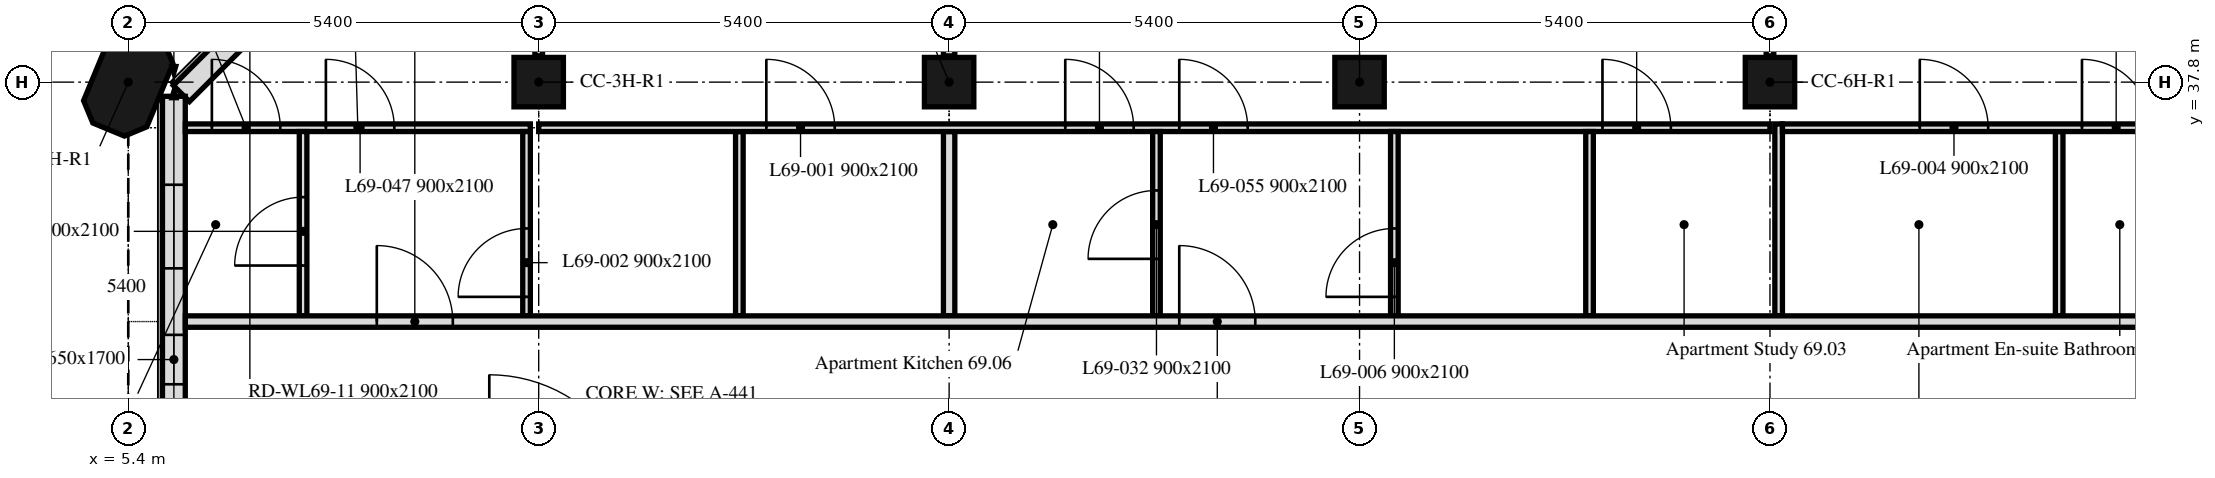
"""IFC4 building model, lengths in metres.
Left out: names, types, materials, properties, quantities, classifications, styles, units other than length and angle.
Written with IfcOpenShell. Run it as: python <this file> out.ifc"""

import sys

from ifc_helpers import new_model, si_unit, direction, frame, frame_2d, origin, origin_2d, place, context, subcontext, project, spatial, polyline, rectangle, outline, extrude, element, fill, save


model = new_model("IFC4")
c1 = context("Model", 3, precision=1e-05, world=origin(), true_north=direction((0.0, 1.0)))
c2 = subcontext(c1, "Body", "Model", "MODEL_VIEW")
j1 = project(units=[si_unit("LENGTHUNIT", "METRE"), si_unit("PLANEANGLEUNIT", "RADIAN")], contexts=[c1])
p1 = place(None, origin())
s1 = spatial("IfcSite", under=j1, at=p1, CompositionType="ELEMENT")
p2 = place(p1, origin())
s2 = spatial("IfcBuilding", under=s1, at=p2, CompositionType="ELEMENT")
p3 = place(p2, frame((0.0, 0.0, 281.8)))
s3 = spatial("IfcBuildingStorey", under=s2, at=p3, CompositionType="ELEMENT", Elevation=281.8)
p4 = place(p3, frame((5.4, 37.8, 0.0), z_axis=(0.0, 0.0, 1.0), x_axis=(0.382683432365, 0.923879532511, 0.0)))
e1 = element("IfcColumn", 1, at=p4, inside=s3, PredefinedType="COLUMN", context=c2, shape_type="SweptSolid", body=[
    extrude(outline(polyline([(-0.45, -0.45), (0.45, -0.45), (0.675, -0.225), (0.675, 0.225), (0.45, 0.45), (-0.45, 0.45), (-0.675, 0.225), (-0.675, -0.225), (-0.45, -0.45)])), origin(), (0.0, 0.0, 1.0), 3.0),
])
for number, where, z_axis, x_axis in (
    (2, (10.8, 37.8, 0.0), (0.0, 0.0, 1.0), (1.0, 0.0, 0.0)),
    (3, (16.2, 37.8, 0.0), (0.0, 0.0, 1.0), (1.0, 0.0, 0.0)),
    (4, (21.6, 37.8, 0.0), (0.0, 0.0, 1.0), (1.0, 0.0, 0.0)),
    (5, (27.0, 37.8, 0.0), (0.0, 0.0, 1.0), (1.0, 0.0, 0.0)),
):
    element("IfcColumn", number, at=place(p3, frame(where, z_axis=z_axis, x_axis=x_axis)), inside=s3, PredefinedType="COLUMN", context=c2, shape_type="SweptSolid", body=[
        extrude(rectangle(XDim=0.65, YDim=0.65, at=origin_2d()), origin(), (0.0, 0.0, 1.0), 3.0),
    ])
p5 = place(p3, frame((10.949, 42.501, 0.0), z_axis=(0.0, 0.0, 1.0), x_axis=(-0.707106781187, -0.707106781187, 0.0)))
e6 = element("IfcWall", 6, at=p5, inside=s3, PredefinedType="SOLIDWALL", context=c2, shape_type="SweptSolid", body=[
    extrude(rectangle(XDim=6.86, YDim=0.3, at=frame_2d((3.43, 0.0))), origin(), (0.0, 0.0, 1.0), 3.0),
])
p6 = place(p5, frame((1.28, 0.0, 0.9)))
e7 = element("IfcOpeningElement", 7, at=p6, cuts=e6, PredefinedType="OPENING", context=c2, shape_type="SweptSolid", body=[
    extrude(rectangle(XDim=1.1, YDim=1.7, at=frame_2d((0.55, 0.85))), frame((0.0, 0.16, 0.0), z_axis=(0.0, -1.0, 0.0), x_axis=(1.0, 0.0, 0.0)), (0.0, 0.0, 1.0), 0.32),
])
p7 = place(p5, frame((4.48, 0.0, 0.9)))
e8 = element("IfcOpeningElement", 8, at=p7, cuts=e6, PredefinedType="OPENING", context=c2, shape_type="SweptSolid", body=[
    extrude(rectangle(XDim=1.1, YDim=1.7, at=frame_2d((0.55, 0.85))), frame((0.0, 0.16, 0.0), z_axis=(0.0, -1.0, 0.0), x_axis=(1.0, 0.0, 0.0)), (0.0, 0.0, 1.0), 0.32),
])
p8 = place(p3, frame((6.0, 37.614, 0.0), z_axis=(0.0, 0.0, 1.0), x_axis=(0.0, -1.0, 0.0)))
e9 = element("IfcWall", 9, at=p8, inside=s3, PredefinedType="SOLIDWALL", context=c2, shape_type="SweptSolid", body=[
    extrude(rectangle(XDim=5.214, YDim=0.3, at=frame_2d((2.607, 0.0))), origin(), (0.0, 0.0, 1.0), 3.0),
])
p9 = place(p8, frame((1.164, 0.0, 0.9)))
e10 = element("IfcOpeningElement", 10, at=p9, cuts=e9, PredefinedType="OPENING", context=c2, shape_type="SweptSolid", body=[
    extrude(rectangle(XDim=1.1, YDim=1.7, at=frame_2d((0.55, 0.85))), frame((0.0, 0.16, 0.0), z_axis=(0.0, -1.0, 0.0), x_axis=(1.0, 0.0, 0.0)), (0.0, 0.0, 1.0), 0.32),
])
p10 = place(p8, frame((3.139, 0.0, 0.9)))
e11 = element("IfcOpeningElement", 11, at=p10, cuts=e9, PredefinedType="OPENING", context=c2, shape_type="SweptSolid", body=[
    extrude(rectangle(XDim=0.65, YDim=1.7, at=frame_2d((0.325, 0.85))), frame((0.0, 0.16, 0.0), z_axis=(0.0, -1.0, 0.0), x_axis=(1.0, 0.0, 0.0)), (0.0, 0.0, 1.0), 0.32),
])
p11 = place(p3, frame((6.151, 37.2, 0.0), z_axis=(0.0, 0.0, 1.0), x_axis=(1.0, 0.0, 0.0)))
e12 = element("IfcWall", 12, at=p11, inside=s3, PredefinedType="PARTITIONING", context=c2, shape_type="SweptSolid", body=[
    extrude(rectangle(XDim=4.539, YDim=0.1, at=frame_2d((2.27, 0.0))), origin(), (0.0, 0.0, 1.0), 3.0),
])
p12 = place(p11, frame((0.349, 0.0, 0.0)))
e13 = element("IfcOpeningElement", 13, at=p12, cuts=e12, PredefinedType="OPENING", context=c2, shape_type="SweptSolid", body=[
    extrude(rectangle(XDim=0.9, YDim=2.1, at=frame_2d((0.45, 1.05))), frame((0.0, 0.05, 0.0), z_axis=(0.0, -1.0, 0.0), x_axis=(1.0, 0.0, 0.0)), (0.0, 0.0, 1.0), 0.1),
])
p13 = place(p11, frame((1.849, 0.0, 0.0)))
e14 = element("IfcOpeningElement", 14, at=p13, cuts=e12, PredefinedType="OPENING", context=c2, shape_type="SweptSolid", body=[
    extrude(rectangle(XDim=0.9, YDim=2.1, at=frame_2d((0.45, 1.05))), frame((0.0, 0.05, 0.0), z_axis=(0.0, -1.0, 0.0), x_axis=(1.0, 0.0, 0.0)), (0.0, 0.0, 1.0), 0.1),
])
p14 = place(p3, frame((10.8, 38.145, 0.0), z_axis=(0.0, 0.0, 1.0), x_axis=(0.0, 1.0, 0.0)))
e15 = element("IfcWall", 15, at=p14, inside=s3, PredefinedType="PARTITIONING", context=c2, shape_type="SweptSolid", body=[
    extrude(rectangle(XDim=3.943, YDim=0.1, at=frame_2d((1.971, 0.0))), origin(), (0.0, 0.0, 1.0), 3.0),
])
p15 = place(p14, frame((1.355, 0.0, 0.0)))
e16 = element("IfcOpeningElement", 16, at=p15, cuts=e15, PredefinedType="OPENING", context=c2, shape_type="SweptSolid", body=[
    extrude(rectangle(XDim=0.9, YDim=2.1, at=frame_2d((0.45, 1.05))), frame((0.0, 0.05, 0.0), z_axis=(0.0, -1.0, 0.0), x_axis=(1.0, 0.0, 0.0)), (0.0, 0.0, 1.0), 0.1),
])
p16 = place(p3, frame((16.2, 38.145, 0.0), z_axis=(0.0, 0.0, 1.0), x_axis=(0.0, 1.0, 0.0)))
e17 = element("IfcWall", 17, at=p16, inside=s3, PredefinedType="PARTITIONING", context=c2, shape_type="SweptSolid", body=[
    extrude(rectangle(XDim=4.304, YDim=0.15, at=frame_2d((2.152, 0.0))), origin(), (0.0, 0.0, 1.0), 3.0),
])
p17 = place(p3, frame((7.7, 34.725, 0.0), z_axis=(0.0, 0.0, 1.0), x_axis=(0.0, 1.0, 0.0)))
e18 = element("IfcWall", 18, at=p17, inside=s3, PredefinedType="PARTITIONING", context=c2, shape_type="SweptSolid", body=[
    extrude(rectangle(XDim=2.425, YDim=0.1, at=frame_2d((1.212, 0.0))), origin(), (0.0, 0.0, 1.0), 3.0),
])
p18 = place(p17, frame((0.662, 0.0, 0.0)))
e19 = element("IfcOpeningElement", 19, at=p18, cuts=e18, PredefinedType="OPENING", context=c2, shape_type="SweptSolid", body=[
    extrude(rectangle(XDim=0.9, YDim=2.1, at=frame_2d((0.45, 1.05))), frame((0.0, 0.05, 0.0), z_axis=(0.0, -1.0, 0.0), x_axis=(1.0, 0.0, 0.0)), (0.0, 0.0, 1.0), 0.1),
])
p19 = place(p3, frame((10.64, 34.725, 0.0), z_axis=(0.0, 0.0, 1.0), x_axis=(0.0, 1.0, 0.0)))
e20 = element("IfcWall", 20, at=p19, inside=s3, PredefinedType="PARTITIONING", context=c2, shape_type="SweptSolid", body=[
    extrude(rectangle(XDim=2.425, YDim=0.1, at=frame_2d((1.212, 0.0))), origin(), (0.0, 0.0, 1.0), 3.0),
])
p20 = place(p19, frame((0.25, 0.0, 0.0)))
e21 = element("IfcOpeningElement", 21, at=p20, cuts=e20, PredefinedType="OPENING", context=c2, shape_type="SweptSolid", body=[
    extrude(rectangle(XDim=0.9, YDim=2.1, at=frame_2d((0.45, 1.05))), frame((0.0, 0.05, 0.0), z_axis=(0.0, -1.0, 0.0), x_axis=(1.0, 0.0, 0.0)), (0.0, 0.0, 1.0), 0.1),
])
p21 = place(p3, frame((13.44, 34.725, 0.0), z_axis=(0.0, 0.0, 1.0), x_axis=(0.0, 1.0, 0.0)))
e22 = element("IfcWall", 22, at=p21, inside=s3, PredefinedType="PARTITIONING", context=c2, shape_type="SweptSolid", body=[
    extrude(rectangle(XDim=2.425, YDim=0.1, at=frame_2d((1.212, 0.0))), origin(), (0.0, 0.0, 1.0), 3.0),
])
p22 = place(p3, frame((16.2, 34.725, 0.0), z_axis=(0.0, 0.0, 1.0), x_axis=(0.0, 1.0, 0.0)))
e23 = element("IfcWall", 23, at=p22, inside=s3, PredefinedType="PARTITIONING", context=c2, shape_type="SweptSolid", body=[
    extrude(rectangle(XDim=2.425, YDim=0.15, at=frame_2d((1.212, 0.0))), origin(), (0.0, 0.0, 1.0), 3.0),
])
p23 = place(p3, frame((10.8, 37.2, 0.0), z_axis=(0.0, 0.0, 1.0), x_axis=(1.0, 0.0, 0.0)))
e24 = element("IfcWall", 24, at=p23, inside=s3, PredefinedType="PARTITIONING", context=c2, shape_type="SweptSolid", body=[
    extrude(rectangle(XDim=16.2, YDim=0.1, at=frame_2d((8.1, 0.0))), origin(), (0.0, 0.0, 1.0), 3.0),
])
p24 = place(p23, frame((2.995, 0.0, 0.0)))
e25 = element("IfcOpeningElement", 25, at=p24, cuts=e24, PredefinedType="OPENING", context=c2, shape_type="SweptSolid", body=[
    extrude(rectangle(XDim=0.9, YDim=2.1, at=frame_2d((0.45, 1.05))), frame((0.0, 0.05, 0.0), z_axis=(0.0, -1.0, 0.0), x_axis=(1.0, 0.0, 0.0)), (0.0, 0.0, 1.0), 0.1),
])
p25 = place(p23, frame((13.996, 0.0, 0.0)))
e26 = element("IfcOpeningElement", 26, at=p25, cuts=e24, PredefinedType="OPENING", context=c2, shape_type="SweptSolid", body=[
    extrude(rectangle(XDim=0.9, YDim=2.1, at=frame_2d((0.45, 1.05))), frame((0.0, 0.05, 0.0), z_axis=(0.0, -1.0, 0.0), x_axis=(1.0, 0.0, 0.0)), (0.0, 0.0, 1.0), 0.1),
])
p26 = place(p23, frame((6.928, 0.0, 0.0)))
e27 = element("IfcOpeningElement", 27, at=p26, cuts=e24, PredefinedType="OPENING", context=c2, shape_type="SweptSolid", body=[
    extrude(rectangle(XDim=0.9, YDim=2.1, at=frame_2d((0.45, 1.05))), frame((0.0, 0.05, 0.0), z_axis=(0.0, -1.0, 0.0), x_axis=(1.0, 0.0, 0.0)), (0.0, 0.0, 1.0), 0.1),
])
p27 = place(p23, frame((8.428, 0.0, 0.0)))
e28 = element("IfcOpeningElement", 28, at=p27, cuts=e24, PredefinedType="OPENING", context=c2, shape_type="SweptSolid", body=[
    extrude(rectangle(XDim=0.9, YDim=2.1, at=frame_2d((0.45, 1.05))), frame((0.0, 0.05, 0.0), z_axis=(0.0, -1.0, 0.0), x_axis=(1.0, 0.0, 0.0)), (0.0, 0.0, 1.0), 0.1),
])
p28 = place(p3, frame((27.0, 38.145, 0.0), z_axis=(0.0, 0.0, 1.0), x_axis=(0.0, 1.0, 0.0)))
e29 = element("IfcWall", 29, at=p28, inside=s3, PredefinedType="PARTITIONING", context=c2, shape_type="SweptSolid", body=[
    extrude(rectangle(XDim=4.304, YDim=0.1, at=frame_2d((2.152, 0.0))), origin(), (0.0, 0.0, 1.0), 3.0),
])
p29 = place(p28, frame((1.98, 0.0, 0.0)))
e30 = element("IfcOpeningElement", 30, at=p29, cuts=e29, PredefinedType="OPENING", context=c2, shape_type="SweptSolid", body=[
    extrude(rectangle(XDim=0.9, YDim=2.1, at=frame_2d((0.45, 1.05))), frame((0.0, 0.05, 0.0), z_axis=(0.0, -1.0, 0.0), x_axis=(1.0, 0.0, 0.0)), (0.0, 0.0, 1.0), 0.1),
])
p30 = place(p3, frame((18.928, 34.725, 0.0), z_axis=(0.0, 0.0, 1.0), x_axis=(0.0, 1.0, 0.0)))
e31 = element("IfcWall", 31, at=p30, inside=s3, PredefinedType="PARTITIONING", context=c2, shape_type="SweptSolid", body=[
    extrude(rectangle(XDim=2.425, YDim=0.1, at=frame_2d((1.212, 0.0))), origin(), (0.0, 0.0, 1.0), 3.0),
])
p31 = place(p30, frame((0.75, 0.0, 0.0)))
e32 = element("IfcOpeningElement", 32, at=p31, cuts=e31, PredefinedType="OPENING", context=c2, shape_type="SweptSolid", body=[
    extrude(rectangle(XDim=0.9, YDim=2.1, at=frame_2d((0.45, 1.05))), frame((0.0, 0.05, 0.0), z_axis=(0.0, -1.0, 0.0), x_axis=(1.0, 0.0, 0.0)), (0.0, 0.0, 1.0), 0.1),
])
p32 = place(p3, frame((22.058, 34.725, 0.0), z_axis=(0.0, 0.0, 1.0), x_axis=(0.0, 1.0, 0.0)))
e33 = element("IfcWall", 33, at=p32, inside=s3, PredefinedType="PARTITIONING", context=c2, shape_type="SweptSolid", body=[
    extrude(rectangle(XDim=2.425, YDim=0.1, at=frame_2d((1.212, 0.0))), origin(), (0.0, 0.0, 1.0), 3.0),
])
p33 = place(p32, frame((0.25, 0.0, 0.0)))
e34 = element("IfcOpeningElement", 34, at=p33, cuts=e33, PredefinedType="OPENING", context=c2, shape_type="SweptSolid", body=[
    extrude(rectangle(XDim=0.9, YDim=2.1, at=frame_2d((0.45, 1.05))), frame((0.0, 0.05, 0.0), z_axis=(0.0, -1.0, 0.0), x_axis=(1.0, 0.0, 0.0)), (0.0, 0.0, 1.0), 0.1),
])
p34 = place(p3, frame((24.626, 34.725, 0.0), z_axis=(0.0, 0.0, 1.0), x_axis=(0.0, 1.0, 0.0)))
e35 = element("IfcWall", 35, at=p34, inside=s3, PredefinedType="PARTITIONING", context=c2, shape_type="SweptSolid", body=[
    extrude(rectangle(XDim=2.425, YDim=0.1, at=frame_2d((1.212, 0.0))), origin(), (0.0, 0.0, 1.0), 3.0),
])
p35 = place(p3, frame((27.114, 34.725, 0.0), z_axis=(0.0, 0.0, 1.0), x_axis=(0.0, 1.0, 0.0)))
e36 = element("IfcWall", 36, at=p35, inside=s3, PredefinedType="PARTITIONING", context=c2, shape_type="SweptSolid", body=[
    extrude(rectangle(XDim=2.525, YDim=0.1, at=frame_2d((1.262, 0.0))), origin(), (0.0, 0.0, 1.0), 3.0),
])
p36 = place(p3, frame((30.805, 34.725, 0.0), z_axis=(0.0, 0.0, 1.0), x_axis=(0.0, 1.0, 0.0)))
e37 = element("IfcWall", 37, at=p36, inside=s3, PredefinedType="PARTITIONING", context=c2, shape_type="SweptSolid", body=[
    extrude(rectangle(XDim=2.425, YDim=0.1, at=frame_2d((1.212, 0.0))), origin(), (0.0, 0.0, 1.0), 3.0),
])
p37 = place(p3, frame((27.164, 37.2, 0.0), z_axis=(0.0, 0.0, 1.0), x_axis=(1.0, 0.0, 0.0)))
e38 = element("IfcWall", 38, at=p37, inside=s3, PredefinedType="PARTITIONING", context=c2, shape_type="SweptSolid", body=[
    extrude(rectangle(XDim=10.636, YDim=0.1, at=frame_2d((5.318, 0.0))), origin(), (0.0, 0.0, 1.0), 3.0),
])
p38 = place(p37, frame((1.807, 0.0, 0.0)))
e39 = element("IfcOpeningElement", 39, at=p38, cuts=e38, PredefinedType="OPENING", context=c2, shape_type="SweptSolid", body=[
    extrude(rectangle(XDim=0.9, YDim=2.1, at=frame_2d((0.45, 1.05))), frame((0.0, 0.05, 0.0), z_axis=(0.0, -1.0, 0.0), x_axis=(1.0, 0.0, 0.0)), (0.0, 0.0, 1.0), 0.1),
])
p39 = place(p37, frame((3.941, 0.0, 0.0)))
e40 = element("IfcOpeningElement", 40, at=p39, cuts=e38, PredefinedType="OPENING", context=c2, shape_type="SweptSolid", body=[
    extrude(rectangle(XDim=0.9, YDim=2.1, at=frame_2d((0.45, 1.05))), frame((0.0, 0.05, 0.0), z_axis=(0.0, -1.0, 0.0), x_axis=(1.0, 0.0, 0.0)), (0.0, 0.0, 1.0), 0.1),
])
p40 = place(p37, frame((6.586, 0.0, 0.0)))
e41 = element("IfcOpeningElement", 41, at=p40, cuts=e38, PredefinedType="OPENING", context=c2, shape_type="SweptSolid", body=[
    extrude(rectangle(XDim=0.9, YDim=2.1, at=frame_2d((0.45, 1.05))), frame((0.0, 0.05, 0.0), z_axis=(0.0, -1.0, 0.0), x_axis=(1.0, 0.0, 0.0)), (0.0, 0.0, 1.0), 0.1),
])
p41 = place(p3, frame((6.151, 34.65, 0.0), z_axis=(0.0, 0.0, 1.0), x_axis=(1.0, 0.0, 0.0)))
e42 = element("IfcWall", 42, at=p41, inside=s3, PredefinedType="PARTITIONING", context=c2, shape_type="SweptSolid", body=[
    extrude(rectangle(XDim=41.698, YDim=0.15, at=frame_2d((20.849, 0.0))), origin(), (0.0, 0.0, 1.0), 3.0),
])
p42 = place(p41, frame((2.519, 0.0, 0.0)))
e43 = element("IfcOpeningElement", 43, at=p42, cuts=e42, PredefinedType="OPENING", context=c2, shape_type="SweptSolid", body=[
    extrude(rectangle(XDim=1.0, YDim=2.1, at=frame_2d((0.5, 1.05))), frame((0.0, 0.075, 0.0), z_axis=(0.0, -1.0, 0.0), x_axis=(1.0, 0.0, 0.0)), (0.0, 0.0, 1.0), 0.15),
])
p43 = place(p41, frame((13.077, 0.0, 0.0)))
e44 = element("IfcOpeningElement", 44, at=p43, cuts=e42, PredefinedType="OPENING", context=c2, shape_type="SweptSolid", body=[
    extrude(rectangle(XDim=1.0, YDim=2.1, at=frame_2d((0.5, 1.05))), frame((0.0, 0.075, 0.0), z_axis=(0.0, -1.0, 0.0), x_axis=(1.0, 0.0, 0.0)), (0.0, 0.0, 1.0), 0.15),
])
p44 = place(p41, frame((32.649, 0.0, 0.0)))
e45 = element("IfcOpeningElement", 45, at=p44, cuts=e42, PredefinedType="OPENING", context=c2, shape_type="SweptSolid", body=[
    extrude(rectangle(XDim=1.0, YDim=2.1, at=frame_2d((0.5, 1.05))), frame((0.0, 0.075, 0.0), z_axis=(0.0, -1.0, 0.0), x_axis=(1.0, 0.0, 0.0)), (0.0, 0.0, 1.0), 0.15),
])
p45 = place(p9, origin())
e46 = element("IfcWindow", 46, at=p45, inside=s3, PartitioningType="SINGLE_PANEL", PredefinedType="WINDOW", context=c2, shape_type="SweptSolid", body=[
    extrude(rectangle(XDim=1.1, YDim=1.7, at=frame_2d((0.55, 0.85))), frame((0.0, 0.03, 0.0), z_axis=(0.0, -1.0, 0.0), x_axis=(1.0, 0.0, 0.0)), (0.0, 0.0, 1.0), 0.06),
])
fill(e10, e46)
p46 = place(p10, origin())
e47 = element("IfcWindow", 47, at=p46, inside=s3, PartitioningType="SINGLE_PANEL", PredefinedType="WINDOW", context=c2, shape_type="SweptSolid", body=[
    extrude(rectangle(XDim=0.65, YDim=1.7, at=frame_2d((0.325, 0.85))), frame((0.0, 0.03, 0.0), z_axis=(0.0, -1.0, 0.0), x_axis=(1.0, 0.0, 0.0)), (0.0, 0.0, 1.0), 0.06),
])
fill(e11, e47)
p47 = place(p24, origin())
e48 = element("IfcDoor", 48, at=p47, inside=s3, OperationType="SINGLE_SWING_RIGHT", PredefinedType="DOOR", context=c2, shape_type="SweptSolid", body=[
    extrude(rectangle(XDim=0.9, YDim=2.1, at=frame_2d((0.45, 1.05))), frame((0.0, 0.025, 0.0), z_axis=(0.0, -1.0, 0.0), x_axis=(1.0, 0.0, 0.0)), (0.0, 0.0, 1.0), 0.05),
])
fill(e25, e48)
p48 = place(p20, origin())
e49 = element("IfcDoor", 49, at=p48, inside=s3, OperationType="SINGLE_SWING_LEFT", PredefinedType="DOOR", context=c2, shape_type="SweptSolid", body=[
    extrude(rectangle(XDim=0.9, YDim=2.1, at=frame_2d((0.45, 1.05))), frame((0.0, 0.025, 0.0), z_axis=(0.0, -1.0, 0.0), x_axis=(1.0, 0.0, 0.0)), (0.0, 0.0, 1.0), 0.05),
])
fill(e21, e49)
p49 = place(p25, origin())
e50 = element("IfcDoor", 50, at=p49, inside=s3, OperationType="SINGLE_SWING_RIGHT", PredefinedType="DOOR", context=c2, shape_type="SweptSolid", body=[
    extrude(rectangle(XDim=0.9, YDim=2.1, at=frame_2d((0.45, 1.05))), frame((0.0, 0.025, 0.0), z_axis=(0.0, -1.0, 0.0), x_axis=(1.0, 0.0, 0.0)), (0.0, 0.0, 1.0), 0.05),
])
fill(e26, e50)
p50 = place(p38, origin())
e51 = element("IfcDoor", 51, at=p50, inside=s3, OperationType="SINGLE_SWING_LEFT", PredefinedType="DOOR", context=c2, shape_type="SweptSolid", body=[
    extrude(rectangle(XDim=0.9, YDim=2.1, at=frame_2d((0.45, 1.05))), frame((0.0, 0.025, 0.0), z_axis=(0.0, -1.0, 0.0), x_axis=(1.0, 0.0, 0.0)), (0.0, 0.0, 1.0), 0.05),
])
fill(e39, e51)
p51 = place(p39, origin())
e52 = element("IfcDoor", 52, at=p51, inside=s3, OperationType="SINGLE_SWING_RIGHT", PredefinedType="DOOR", context=c2, shape_type="SweptSolid", body=[
    extrude(rectangle(XDim=0.9, YDim=2.1, at=frame_2d((0.45, 1.05))), frame((0.0, 0.025, 0.0), z_axis=(0.0, -1.0, 0.0), x_axis=(1.0, 0.0, 0.0)), (0.0, 0.0, 1.0), 0.05),
])
fill(e40, e52)
p52 = place(p33, origin())
e53 = element("IfcDoor", 53, at=p52, inside=s3, OperationType="SINGLE_SWING_RIGHT", PredefinedType="DOOR", context=c2, shape_type="SweptSolid", body=[
    extrude(rectangle(XDim=0.9, YDim=2.1, at=frame_2d((0.45, 1.05))), frame((0.0, 0.025, 0.0), z_axis=(0.0, -1.0, 0.0), x_axis=(1.0, 0.0, 0.0)), (0.0, 0.0, 1.0), 0.05),
])
fill(e34, e53)
p53 = place(p12, origin())
e54 = element("IfcDoor", 54, at=p53, inside=s3, OperationType="SINGLE_SWING_LEFT", PredefinedType="DOOR", context=c2, shape_type="SweptSolid", body=[
    extrude(rectangle(XDim=0.9, YDim=2.1, at=frame_2d((0.45, 1.05))), frame((0.0, 0.025, 0.0), z_axis=(0.0, -1.0, 0.0), x_axis=(1.0, 0.0, 0.0)), (0.0, 0.0, 1.0), 0.05),
])
fill(e13, e54)
p54 = place(p18, origin())
e55 = element("IfcDoor", 55, at=p54, inside=s3, OperationType="SINGLE_SWING_LEFT", PredefinedType="DOOR", context=c2, shape_type="SweptSolid", body=[
    extrude(rectangle(XDim=0.9, YDim=2.1, at=frame_2d((0.45, 1.05))), frame((0.0, 0.025, 0.0), z_axis=(0.0, -1.0, 0.0), x_axis=(1.0, 0.0, 0.0)), (0.0, 0.0, 1.0), 0.05),
])
fill(e19, e55)
p55 = place(p26, origin())
e56 = element("IfcDoor", 56, at=p55, inside=s3, OperationType="SINGLE_SWING_LEFT", PredefinedType="DOOR", context=c2, shape_type="SweptSolid", body=[
    extrude(rectangle(XDim=0.9, YDim=2.1, at=frame_2d((0.45, 1.05))), frame((0.0, 0.025, 0.0), z_axis=(0.0, -1.0, 0.0), x_axis=(1.0, 0.0, 0.0)), (0.0, 0.0, 1.0), 0.05),
])
fill(e27, e56)
p56 = place(p31, origin())
e57 = element("IfcDoor", 57, at=p56, inside=s3, OperationType="SINGLE_SWING_RIGHT", PredefinedType="DOOR", context=c2, shape_type="SweptSolid", body=[
    extrude(rectangle(XDim=0.9, YDim=2.1, at=frame_2d((0.45, 1.05))), frame((0.0, 0.025, 0.0), z_axis=(0.0, -1.0, 0.0), x_axis=(1.0, 0.0, 0.0)), (0.0, 0.0, 1.0), 0.05),
])
fill(e32, e57)
p57 = place(p13, origin())
e58 = element("IfcDoor", 58, at=p57, inside=s3, OperationType="SINGLE_SWING_RIGHT", PredefinedType="DOOR", context=c2, shape_type="SweptSolid", body=[
    extrude(rectangle(XDim=0.9, YDim=2.1, at=frame_2d((0.45, 1.05))), frame((0.0, 0.025, 0.0), z_axis=(0.0, -1.0, 0.0), x_axis=(1.0, 0.0, 0.0)), (0.0, 0.0, 1.0), 0.05),
])
fill(e14, e58)
p58 = place(p42, origin())
e59 = element("IfcDoor", 59, at=p58, inside=s3, OperationType="SINGLE_SWING_RIGHT", PredefinedType="DOOR", context=c2, shape_type="SweptSolid", body=[
    extrude(rectangle(XDim=1.0, YDim=2.1, at=frame_2d((0.5, 1.05))), frame((0.0, 0.025, 0.0), z_axis=(0.0, -1.0, 0.0), x_axis=(1.0, 0.0, 0.0)), (0.0, 0.0, 1.0), 0.05),
])
fill(e43, e59)
p59 = place(p27, origin())
e60 = element("IfcDoor", 60, at=p59, inside=s3, OperationType="SINGLE_SWING_RIGHT", PredefinedType="DOOR", context=c2, shape_type="SweptSolid", body=[
    extrude(rectangle(XDim=0.9, YDim=2.1, at=frame_2d((0.45, 1.05))), frame((0.0, 0.025, 0.0), z_axis=(0.0, -1.0, 0.0), x_axis=(1.0, 0.0, 0.0)), (0.0, 0.0, 1.0), 0.05),
])
fill(e28, e60)
p60 = place(p43, origin())
e61 = element("IfcDoor", 61, at=p60, inside=s3, OperationType="SINGLE_SWING_RIGHT", PredefinedType="DOOR", context=c2, shape_type="SweptSolid", body=[
    extrude(rectangle(XDim=1.0, YDim=2.1, at=frame_2d((0.5, 1.05))), frame((0.0, 0.025, 0.0), z_axis=(0.0, -1.0, 0.0), x_axis=(1.0, 0.0, 0.0)), (0.0, 0.0, 1.0), 0.05),
])
fill(e44, e61)
save(model, sys.argv[1])
